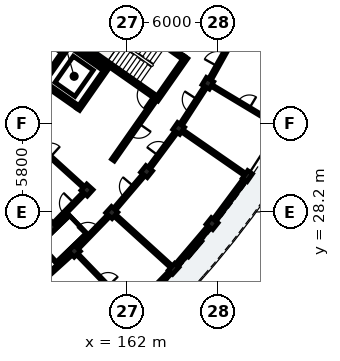
"""IFC4 building model, lengths in metres.
Left out: names, types, materials, properties, quantities, classifications, styles, units other than length and angle.
Written with IfcOpenShell. Run it as: python <this file> out.ifc"""

import sys

from ifc_helpers import new_model, si_unit, direction, frame, frame_2d, origin, origin_2d, place, context, subcontext, project, spatial, rectangle, extrude, element, fill, save


model = new_model("IFC4")
c1 = context("Model", 3, precision=1e-05, world=origin(), true_north=direction((0.0, 1.0)))
c2 = subcontext(c1, "Body", "Model", "MODEL_VIEW")
j1 = project(units=[si_unit("LENGTHUNIT", "METRE"), si_unit("PLANEANGLEUNIT", "RADIAN")], contexts=[c1])
p1 = place(None, origin())
s1 = spatial("IfcSite", under=j1, at=p1, CompositionType="ELEMENT")
p2 = place(p1, origin())
s2 = spatial("IfcBuilding", under=s1, at=p2, CompositionType="ELEMENT")
p3 = place(p2, frame((0.0, 0.0, 22.28)))
s3 = spatial("IfcBuildingStorey", under=s2, at=p3, CompositionType="ELEMENT", Elevation=22.28)
p4 = place(p3, frame((165.733, 38.336, 0.0), z_axis=(0.0, 0.0, 1.0), x_axis=(-0.819153711596, 0.573574055182, 0.0)))
e1 = element("IfcWall", 1, at=p4, inside=s3, PredefinedType="SHEAR", context=c2, shape_type="SweptSolid", body=[
    extrude(rectangle(XDim=6.6, YDim=0.25, at=frame_2d((3.3, 0.0))), origin(), (0.0, 0.0, 1.0), 3.11),
])
p5 = place(p3, frame((165.907, 38.366, 0.0), z_axis=(0.0, 0.0, 1.0), x_axis=(-0.573582112484, -0.819148069789, 0.0)))
e2 = element("IfcWall", 2, at=p5, inside=s3, PredefinedType="SHEAR", context=c2, shape_type="SweptSolid", body=[
    extrude(rectangle(XDim=3.42, YDim=0.25, at=frame_2d((1.71, 0.0))), origin(), (0.0, 0.0, 1.0), 3.11),
])
p6 = place(p3, frame((163.914, 35.739, 0.0), z_axis=(0.0, 0.0, 1.0), x_axis=(-0.819153711596, 0.573574055182, 0.0)))
e3 = element("IfcWall", 3, at=p6, inside=s3, PredefinedType="SHEAR", context=c2, shape_type="SweptSolid", body=[
    extrude(rectangle(XDim=6.6, YDim=0.25, at=frame_2d((3.3, 0.0))), origin(), (0.0, 0.0, 1.0), 3.11),
])
p7 = place(p6, frame((0.22, 0.0, 0.0)))
e4 = element("IfcOpeningElement", 4, at=p7, cuts=e3, PredefinedType="OPENING", context=c2, shape_type="SweptSolid", body=[
    extrude(rectangle(XDim=1.05, YDim=2.15, at=frame_2d((0.525, 1.075))), frame((0.0, 0.135, 0.0), z_axis=(0.0, -1.0, 0.0), x_axis=(1.0, 0.0, 0.0)), (0.0, 0.0, 1.0), 0.27),
])
p8 = place(p3, frame((160.668, 37.615, 0.0), z_axis=(0.0, 0.0, 1.0), x_axis=(-0.573582966431, -0.819147471839, 0.0)))
e5 = element("IfcWall", 5, at=p8, inside=s3, PredefinedType="SHEAR", context=c2, shape_type="SweptSolid", body=[
    extrude(rectangle(XDim=3.26, YDim=0.23, at=frame_2d((1.63, 0.0))), origin(), (0.0, 0.0, 1.0), 3.11),
])
p9 = place(p8, frame((0.9, 0.0, 0.0)))
e6 = element("IfcOpeningElement", 6, at=p9, cuts=e5, PredefinedType="OPENING", context=c2, shape_type="SweptSolid", body=[
    extrude(rectangle(XDim=1.0, YDim=2.15, at=frame_2d((0.5, 1.075))), frame((0.0, 0.125, 0.0), z_axis=(0.0, -1.0, 0.0), x_axis=(1.0, 0.0, 0.0)), (0.0, 0.0, 1.0), 0.25),
])
p10 = place(p3, frame((158.268, 39.296, 0.0), z_axis=(0.0, 0.0, 1.0), x_axis=(-0.573582966431, -0.819147471839, 0.0)))
e7 = element("IfcWall", 7, at=p10, inside=s3, PredefinedType="SHEAR", context=c2, shape_type="SweptSolid", body=[
    extrude(rectangle(XDim=3.26, YDim=0.23, at=frame_2d((1.63, 0.0))), origin(), (0.0, 0.0, 1.0), 3.11),
])
p11 = place(p3, frame((160.508, 37.587, 0.0), z_axis=(0.0, 0.0, 1.0), x_axis=(-0.819189439894, 0.573523026186, 0.0)))
e8 = element("IfcWall", 8, at=p11, inside=s3, PredefinedType="SHEAR", context=c2, shape_type="SweptSolid", body=[
    extrude(rectangle(XDim=2.7, YDim=0.23, at=frame_2d((1.35, 0.0))), origin(), (0.0, 0.0, 1.0), 3.11),
])
p12 = place(p3, frame((158.77, 35.105, 0.0), z_axis=(0.0, 0.0, 1.0), x_axis=(-0.819117209968, 0.573626181702, 0.0)))
e9 = element("IfcWall", 9, at=p12, inside=s3, PredefinedType="SHEAR", context=c2, shape_type="SweptSolid", body=[
    extrude(rectangle(XDim=2.7, YDim=0.23, at=frame_2d((1.35, 0.0))), origin(), (0.0, 0.0, 1.0), 3.11),
])
for number, where, z_axis, x_axis in (
    (10, (157.018, 27.202, 0.0), (0.0, 0.0, 1.0), (0.695, -0.719, 0.0)),
    (11, (158.546, 25.62, 0.0), (0.0, 0.0, 1.0), (0.695, -0.719, 0.0)),
    (12, (159.38, 29.638, 0.0), (0.0, 0.0, 1.0), (0.74, -0.672, 0.0)),
    (13, (161.009, 28.159, 0.0), (0.0, 0.0, 1.0), (0.74, -0.672, 0.0)),
):
    element("IfcColumn", number, at=place(p3, frame(where, z_axis=z_axis, x_axis=x_axis)), inside=s3, PredefinedType="COLUMN", context=c2, shape_type="SweptSolid", body=[
        extrude(rectangle(XDim=0.56, YDim=0.56, at=origin_2d()), origin(), (0.0, 0.0, 1.0), 3.11),
    ])
p13 = place(p3, frame((165.08, 24.46, 0.0), z_axis=(0.0, 0.0, 1.0), x_axis=(0.740218127487, -0.672366807435, 0.0)))
e14 = element("IfcColumn", 14, at=p13, inside=s3, PredefinedType="PILASTER", context=c2, shape_type="SweptSolid", body=[
    extrude(rectangle(XDim=0.38, YDim=0.62, at=origin_2d()), origin(), (0.0, 0.0, 1.0), 3.11),
])
for number, where, z_axis, x_axis in (
    (15, (163.3, 30.853, 0.0), (0.0, 0.0, 1.0), (0.783, -0.623, 0.0)),
    (16, (167.604, 27.429, 0.0), (0.0, 0.0, 1.0), (0.783, -0.623, 0.0)),
    (17, (165.41, 33.692, 0.0), (0.0, 0.0, 1.0), (0.822, -0.57, 0.0)),
):
    element("IfcColumn", number, at=place(p3, frame(where, z_axis=z_axis, x_axis=x_axis)), inside=s3, PredefinedType="COLUMN", context=c2, shape_type="SweptSolid", body=[
        extrude(rectangle(XDim=0.56, YDim=0.56, at=origin_2d()), origin(), (0.0, 0.0, 1.0), 3.11),
    ])
p14 = place(p3, frame((169.929, 30.557, 0.0), z_axis=(0.0, 0.0, 1.0), x_axis=(0.821646937942, -0.569996762596, 0.0)))
e18 = element("IfcColumn", 18, at=p14, inside=s3, PredefinedType="PILASTER", context=c2, shape_type="SweptSolid", body=[
    extrude(rectangle(XDim=0.38, YDim=0.62, at=origin_2d()), origin(), (0.0, 0.0, 1.0), 3.11),
])
p15 = place(p3, frame((167.33, 36.662, 0.0), z_axis=(0.0, 0.0, 1.0), x_axis=(0.857167300702, -0.51503807491, 0.0)))
e19 = element("IfcColumn", 19, at=p15, inside=s3, PredefinedType="COLUMN", context=c2, shape_type="SweptSolid", body=[
    extrude(rectangle(XDim=0.56, YDim=0.56, at=origin_2d()), origin(), (0.0, 0.0, 1.0), 3.11),
])
p16 = place(p3, frame((162.541, 21.843, 0.0), z_axis=(0.0, 0.0, 1.0), x_axis=(0.696205978342, 0.717842068788, 0.0)))
e20 = element("IfcWall", 20, at=p16, inside=s3, PredefinedType="SOLIDWALL", context=c2, shape_type="SweptSolid", body=[
    extrude(rectangle(XDim=3.487, YDim=0.24, at=frame_2d((1.743, 0.0))), origin(), (0.0, 0.0, 1.0), 2.355),
])
p17 = place(p16, frame((0.943, 0.0, 0.35)))
e21 = element("IfcOpeningElement", 21, at=p17, cuts=e20, PredefinedType="OPENING", context=c2, shape_type="SweptSolid", body=[
    extrude(rectangle(XDim=1.6, YDim=1.75, at=frame_2d((0.8, 0.875))), frame((0.0, 0.13, 0.0), z_axis=(0.0, -1.0, 0.0), x_axis=(1.0, 0.0, 0.0)), (0.0, 0.0, 1.0), 0.26),
])
p18 = place(p3, frame((165.184, 24.583, 0.0), z_axis=(0.0, 0.0, 1.0), x_axis=(0.647811002696, 0.761801092665, 0.0)))
e22 = element("IfcWall", 22, at=p18, inside=s3, PredefinedType="SOLIDWALL", context=c2, shape_type="SweptSolid", body=[
    extrude(rectangle(XDim=3.487, YDim=0.24, at=frame_2d((1.743, 0.0))), origin(), (0.0, 0.0, 1.0), 2.355),
])
p19 = place(p18, frame((0.868, 0.0, 0.35)))
e23 = element("IfcOpeningElement", 23, at=p19, cuts=e22, PredefinedType="OPENING", context=c2, shape_type="SweptSolid", body=[
    extrude(rectangle(XDim=1.75, YDim=1.85, at=frame_2d((0.875, 0.925))), frame((0.0, 0.13, 0.0), z_axis=(0.0, -1.0, 0.0), x_axis=(1.0, 0.0, 0.0)), (0.0, 0.0, 1.0), 0.26),
])
p20 = place(p3, frame((167.753, 27.63, 0.0), z_axis=(0.0, 0.0, 1.0), x_axis=(0.596611432616, 0.802530247699, 0.0)))
e24 = element("IfcWall", 24, at=p20, inside=s3, PredefinedType="SOLIDWALL", context=c2, shape_type="SweptSolid", body=[
    extrude(rectangle(XDim=3.487, YDim=0.24, at=frame_2d((1.743, 0.0))), origin(), (0.0, 0.0, 1.0), 2.355),
])
p21 = place(p20, frame((1.153, 0.0, 0.55)))
e25 = element("IfcOpeningElement", 25, at=p21, cuts=e24, PredefinedType="OPENING", context=c2, shape_type="SweptSolid", body=[
    extrude(rectangle(XDim=1.18, YDim=1.48, at=frame_2d((0.59, 0.74))), frame((0.0, 0.13, 0.0), z_axis=(0.0, -1.0, 0.0), x_axis=(1.0, 0.0, 0.0)), (0.0, 0.0, 1.0), 0.26),
])
p22 = place(p3, frame((163.895, 35.624, 0.0), z_axis=(0.0, 0.0, 1.0), x_axis=(-0.573572687386, -0.819154669329, 0.0)))
e26 = element("IfcWall", 26, at=p22, inside=s3, PredefinedType="PARTITIONING", context=c2, shape_type="SweptSolid", body=[
    extrude(rectangle(XDim=4.9, YDim=0.22, at=frame_2d((2.45, 0.0))), origin(), (0.0, 0.0, 1.0), 2.34),
])
p23 = place(p22, frame((1.95, 0.0, 0.0)))
e27 = element("IfcOpeningElement", 27, at=p23, cuts=e26, PredefinedType="OPENING", context=c2, shape_type="SweptSolid", body=[
    extrude(rectangle(XDim=0.98, YDim=2.14, at=frame_2d((0.49, 1.07))), frame((0.0, 0.12, 0.0), z_axis=(0.0, -1.0, 0.0), x_axis=(1.0, 0.0, 0.0)), (0.0, 0.0, 1.0), 0.24),
])
p24 = place(p3, frame((156.183, 23.482, 0.0), z_axis=(0.0, 0.0, 1.0), x_axis=(0.741631592147, 0.670807410163, 0.0)))
e28 = element("IfcWall", 28, at=p24, inside=s3, PredefinedType="PARTITIONING", context=c2, shape_type="SweptSolid", body=[
    extrude(rectangle(XDim=2.837, YDim=0.195, at=frame_2d((1.418, 0.0))), origin(), (0.0, 0.0, 1.0), 2.37),
])
p25 = place(p24, frame((0.924, 0.0, 0.0)))
e29 = element("IfcOpeningElement", 29, at=p25, cuts=e28, PredefinedType="OPENING", context=c2, shape_type="SweptSolid", body=[
    extrude(rectangle(XDim=0.99, YDim=2.16, at=frame_2d((0.495, 1.08))), frame((0.0, 0.107, 0.0), z_axis=(0.0, -1.0, 0.0), x_axis=(1.0, 0.0, 0.0)), (0.0, 0.0, 1.0), 0.215),
])
p26 = place(p3, frame((158.824, 25.332, 0.0), z_axis=(0.0, 0.0, 1.0), x_axis=(0.69466218314, -0.719336118456, 0.0)))
e30 = element("IfcWall", 30, at=p26, inside=s3, PredefinedType="PARTITIONING", context=c2, shape_type="SweptSolid", body=[
    extrude(rectangle(XDim=4.7, YDim=0.125, at=frame_2d((2.35, 0.0))), origin(), (0.0, 0.0, 1.0), 2.37),
])
p27 = place(p26, frame((1.905, 0.0, 0.0)))
e31 = element("IfcOpeningElement", 31, at=p27, cuts=e30, PredefinedType="OPENING", context=c2, shape_type="SweptSolid", body=[
    extrude(rectangle(XDim=0.89, YDim=2.1, at=frame_2d((0.445, 1.05))), frame((0.0, 0.073, 0.0), z_axis=(0.0, -1.0, 0.0), x_axis=(1.0, 0.0, 0.0)), (0.0, 0.0, 1.0), 0.145),
])
p28 = place(p3, frame((158.79, 25.871, 0.0), z_axis=(0.0, 0.0, 1.0), x_axis=(0.696223786753, 0.717824796701, 0.0)))
e32 = element("IfcWall", 32, at=p28, inside=s3, PredefinedType="PARTITIONING", context=c2, shape_type="SweptSolid", body=[
    extrude(rectangle(XDim=2.837, YDim=0.195, at=frame_2d((1.418, 0.0))), origin(), (0.0, 0.0, 1.0), 2.37),
])
p29 = place(p28, frame((0.934, 0.0, 0.0)))
e33 = element("IfcOpeningElement", 33, at=p29, cuts=e32, PredefinedType="OPENING", context=c2, shape_type="SweptSolid", body=[
    extrude(rectangle(XDim=0.97, YDim=2.15, at=frame_2d((0.485, 1.075))), frame((0.0, 0.107, 0.0), z_axis=(0.0, -1.0, 0.0), x_axis=(1.0, 0.0, 0.0)), (0.0, 0.0, 1.0), 0.215),
])
p30 = place(p3, frame((157.262, 27.453, 0.0), z_axis=(0.0, 0.0, 1.0), x_axis=(0.696236443412, 0.717812520694, 0.0)))
e34 = element("IfcWall", 34, at=p30, inside=s3, PredefinedType="PARTITIONING", context=c2, shape_type="SweptSolid", body=[
    extrude(rectangle(XDim=2.693, YDim=0.195, at=frame_2d((1.347, 0.0))), origin(), (0.0, 0.0, 1.0), 2.37),
])
p31 = place(p30, frame((0.862, 0.0, 0.0)))
e35 = element("IfcOpeningElement", 35, at=p31, cuts=e34, PredefinedType="OPENING", context=c2, shape_type="SweptSolid", body=[
    extrude(rectangle(XDim=0.97, YDim=2.15, at=frame_2d((0.485, 1.075))), frame((0.0, 0.107, 0.0), z_axis=(0.0, -1.0, 0.0), x_axis=(1.0, 0.0, 0.0)), (0.0, 0.0, 1.0), 0.215),
])
p32 = place(p3, frame((161.305, 27.89, 0.0), z_axis=(0.0, 0.0, 1.0), x_axis=(0.740212663782, -0.672372822456, 0.0)))
e36 = element("IfcWall", 36, at=p32, inside=s3, PredefinedType="PARTITIONING", context=c2, shape_type="SweptSolid", body=[
    extrude(rectangle(XDim=4.7, YDim=0.175, at=frame_2d((2.35, 0.0))), origin(), (0.0, 0.0, 1.0), 2.37),
])
p33 = place(p3, frame((154.199, 34.344, 0.0), z_axis=(0.0, 0.0, 1.0), x_axis=(0.74023124711, -0.672352363573, 0.0)))
e37 = element("IfcWall", 37, at=p33, inside=s3, PredefinedType="PARTITIONING", context=c2, shape_type="SweptSolid", body=[
    extrude(rectangle(XDim=6.6, YDim=0.125, at=frame_2d((3.3, 0.0))), origin(), (0.0, 0.0, 1.0), 2.37),
])
p34 = place(p33, frame((2.845, 0.0, 0.0)))
e38 = element("IfcOpeningElement", 38, at=p34, cuts=e37, PredefinedType="OPENING", context=c2, shape_type="SweptSolid", body=[
    extrude(rectangle(XDim=0.91, YDim=2.1, at=frame_2d((0.455, 1.05))), frame((0.0, 0.073, 0.0), z_axis=(0.0, -1.0, 0.0), x_axis=(1.0, 0.0, 0.0)), (0.0, 0.0, 1.0), 0.145),
])
p35 = place(p3, frame((161.236, 28.425, 0.0), z_axis=(0.0, 0.0, 1.0), x_axis=(0.64778830669, 0.761820392032, 0.0)))
e39 = element("IfcWall", 39, at=p35, inside=s3, PredefinedType="PARTITIONING", context=c2, shape_type="SweptSolid", body=[
    extrude(rectangle(XDim=2.837, YDim=0.195, at=frame_2d((1.418, 0.0))), origin(), (0.0, 0.0, 1.0), 2.37),
])
p36 = place(p35, frame((0.944, 0.0, 0.0)))
e40 = element("IfcOpeningElement", 40, at=p36, cuts=e39, PredefinedType="OPENING", context=c2, shape_type="SweptSolid", body=[
    extrude(rectangle(XDim=0.95, YDim=2.13, at=frame_2d((0.475, 1.065))), frame((0.0, 0.107, 0.0), z_axis=(0.0, -1.0, 0.0), x_axis=(1.0, 0.0, 0.0)), (0.0, 0.0, 1.0), 0.215),
])
p37 = place(p3, frame((163.509, 31.134, 0.0), z_axis=(0.0, 0.0, 1.0), x_axis=(0.596552136601, 0.802574325727, 0.0)))
e41 = element("IfcWall", 41, at=p37, inside=s3, PredefinedType="PARTITIONING", context=c2, shape_type="SweptSolid", body=[
    extrude(rectangle(XDim=2.837, YDim=0.195, at=frame_2d((1.418, 0.0))), origin(), (0.0, 0.0, 1.0), 2.37),
])
p38 = place(p37, frame((0.954, 0.0, 0.0)))
e42 = element("IfcOpeningElement", 42, at=p38, cuts=e41, PredefinedType="OPENING", context=c2, shape_type="SweptSolid", body=[
    extrude(rectangle(XDim=0.93, YDim=2.12, at=frame_2d((0.465, 1.06))), frame((0.0, 0.107, 0.0), z_axis=(0.0, -1.0, 0.0), x_axis=(1.0, 0.0, 0.0)), (0.0, 0.0, 1.0), 0.215),
])
p39 = place(p3, frame((165.739, 33.464, 0.0), z_axis=(0.0, 0.0, 1.0), x_axis=(0.821638260647, -0.570009270663, 0.0)))
e43 = element("IfcWall", 43, at=p39, inside=s3, PredefinedType="PARTITIONING", context=c2, shape_type="SweptSolid", body=[
    extrude(rectangle(XDim=4.7, YDim=0.175, at=frame_2d((2.35, 0.0))), origin(), (0.0, 0.0, 1.0), 2.37),
])
p40 = place(p3, frame((165.6, 33.986, 0.0), z_axis=(0.0, 0.0, 1.0), x_axis=(0.542787304957, 0.83987019329, 0.0)))
e44 = element("IfcWall", 44, at=p40, inside=s3, PredefinedType="PARTITIONING", context=c2, shape_type="SweptSolid", body=[
    extrude(rectangle(XDim=2.837, YDim=0.195, at=frame_2d((1.418, 0.0))), origin(), (0.0, 0.0, 1.0), 2.37),
])
p41 = place(p40, frame((0.924, 0.0, 0.0)))
e45 = element("IfcOpeningElement", 45, at=p41, cuts=e44, PredefinedType="OPENING", context=c2, shape_type="SweptSolid", body=[
    extrude(rectangle(XDim=0.99, YDim=2.16, at=frame_2d((0.495, 1.08))), frame((0.0, 0.107, 0.0), z_axis=(0.0, -1.0, 0.0), x_axis=(1.0, 0.0, 0.0)), (0.0, 0.0, 1.0), 0.215),
])
p42 = place(p3, frame((167.673, 36.456, 0.0), z_axis=(0.0, 0.0, 1.0), x_axis=(0.857139805444, -0.515083831937, 0.0)))
e46 = element("IfcWall", 46, at=p42, inside=s3, PredefinedType="PARTITIONING", context=c2, shape_type="SweptSolid", body=[
    extrude(rectangle(XDim=4.7, YDim=0.125, at=frame_2d((2.35, 0.0))), origin(), (0.0, 0.0, 1.0), 2.37),
])
p43 = place(p42, frame((1.915, 0.0, 0.0)))
e47 = element("IfcOpeningElement", 47, at=p43, cuts=e46, PredefinedType="OPENING", context=c2, shape_type="SweptSolid", body=[
    extrude(rectangle(XDim=0.87, YDim=2.08, at=frame_2d((0.435, 1.04))), frame((0.0, 0.073, 0.0), z_axis=(0.0, -1.0, 0.0), x_axis=(1.0, 0.0, 0.0)), (0.0, 0.0, 1.0), 0.145),
])
p44 = place(p3, frame((167.5, 36.968, 0.0), z_axis=(0.0, 0.0, 1.0), x_axis=(0.48673124079, 0.8735517725, 0.0)))
e48 = element("IfcWall", 48, at=p44, inside=s3, PredefinedType="PARTITIONING", context=c2, shape_type="SweptSolid", body=[
    extrude(rectangle(XDim=2.837, YDim=0.195, at=frame_2d((1.418, 0.0))), origin(), (0.0, 0.0, 1.0), 2.37),
])
p45 = place(p44, frame((0.934, 0.0, 0.0)))
e49 = element("IfcOpeningElement", 49, at=p45, cuts=e48, PredefinedType="OPENING", context=c2, shape_type="SweptSolid", body=[
    extrude(rectangle(XDim=0.97, YDim=2.15, at=frame_2d((0.485, 1.075))), frame((0.0, 0.107, 0.0), z_axis=(0.0, -1.0, 0.0), x_axis=(1.0, 0.0, 0.0)), (0.0, 0.0, 1.0), 0.215),
])
p46 = place(p17, origin())
e50 = element("IfcWindow", 50, at=p46, inside=s3, PartitioningType="SINGLE_PANEL", PredefinedType="WINDOW", context=c2, shape_type="SweptSolid", body=[
    extrude(rectangle(XDim=1.6, YDim=1.75, at=frame_2d((0.8, 0.875))), frame((0.0, 0.03, 0.0), z_axis=(0.0, -1.0, 0.0), x_axis=(1.0, 0.0, 0.0)), (0.0, 0.0, 1.0), 0.06),
])
fill(e21, e50)
p47 = place(p19, origin())
e51 = element("IfcWindow", 51, at=p47, inside=s3, PartitioningType="SINGLE_PANEL", PredefinedType="WINDOW", context=c2, shape_type="SweptSolid", body=[
    extrude(rectangle(XDim=1.75, YDim=1.85, at=frame_2d((0.875, 0.925))), frame((0.0, 0.03, 0.0), z_axis=(0.0, -1.0, 0.0), x_axis=(1.0, 0.0, 0.0)), (0.0, 0.0, 1.0), 0.06),
])
fill(e23, e51)
p48 = place(p21, origin())
e52 = element("IfcWindow", 52, at=p48, inside=s3, PartitioningType="SINGLE_PANEL", PredefinedType="WINDOW", context=c2, shape_type="SweptSolid", body=[
    extrude(rectangle(XDim=1.18, YDim=1.48, at=frame_2d((0.59, 0.74))), frame((0.0, 0.03, 0.0), z_axis=(0.0, -1.0, 0.0), x_axis=(1.0, 0.0, 0.0)), (0.0, 0.0, 1.0), 0.06),
])
fill(e25, e52)
p49 = place(p7, origin())
e53 = element("IfcDoor", 53, at=p49, inside=s3, OperationType="SINGLE_SWING_LEFT", PredefinedType="DOOR", context=c2, shape_type="SweptSolid", body=[
    extrude(rectangle(XDim=1.05, YDim=2.15, at=frame_2d((0.525, 1.075))), frame((0.0, 0.025, 0.0), z_axis=(0.0, -1.0, 0.0), x_axis=(1.0, 0.0, 0.0)), (0.0, 0.0, 1.0), 0.05),
])
fill(e4, e53)
p50 = place(p9, origin())
e54 = element("IfcDoor", 54, at=p50, inside=s3, OperationType="DOUBLE_DOOR_SLIDING", PredefinedType="DOOR", context=c2, shape_type="SweptSolid", body=[
    extrude(rectangle(XDim=1.0, YDim=2.15, at=frame_2d((0.5, 1.075))), frame((0.0, 0.025, 0.0), z_axis=(0.0, -1.0, 0.0), x_axis=(1.0, 0.0, 0.0)), (0.0, 0.0, 1.0), 0.05),
])
fill(e6, e54)
p51 = place(p23, origin())
e55 = element("IfcDoor", 55, at=p51, inside=s3, OperationType="SINGLE_SWING_LEFT", PredefinedType="DOOR", context=c2, shape_type="SweptSolid", body=[
    extrude(rectangle(XDim=0.98, YDim=2.14, at=frame_2d((0.49, 1.07))), frame((0.0, 0.025, 0.0), z_axis=(0.0, -1.0, 0.0), x_axis=(1.0, 0.0, 0.0)), (0.0, 0.0, 1.0), 0.05),
])
fill(e27, e55)
p52 = place(p25, origin())
e56 = element("IfcDoor", 56, at=p52, inside=s3, OperationType="SINGLE_SWING_RIGHT", PredefinedType="DOOR", context=c2, shape_type="SweptSolid", body=[
    extrude(rectangle(XDim=0.99, YDim=2.16, at=frame_2d((0.495, 1.08))), frame((0.0, 0.025, 0.0), z_axis=(0.0, -1.0, 0.0), x_axis=(1.0, 0.0, 0.0)), (0.0, 0.0, 1.0), 0.05),
])
fill(e29, e56)
p53 = place(p27, origin())
e57 = element("IfcDoor", 57, at=p53, inside=s3, OperationType="SINGLE_SWING_RIGHT", PredefinedType="DOOR", context=c2, shape_type="SweptSolid", body=[
    extrude(rectangle(XDim=0.89, YDim=2.1, at=frame_2d((0.445, 1.05))), frame((0.0, 0.025, 0.0), z_axis=(0.0, -1.0, 0.0), x_axis=(1.0, 0.0, 0.0)), (0.0, 0.0, 1.0), 0.05),
])
fill(e31, e57)
p54 = place(p29, origin())
e58 = element("IfcDoor", 58, at=p54, inside=s3, OperationType="SINGLE_SWING_LEFT", PredefinedType="DOOR", context=c2, shape_type="SweptSolid", body=[
    extrude(rectangle(XDim=0.97, YDim=2.15, at=frame_2d((0.485, 1.075))), frame((0.0, 0.025, 0.0), z_axis=(0.0, -1.0, 0.0), x_axis=(1.0, 0.0, 0.0)), (0.0, 0.0, 1.0), 0.05),
])
fill(e33, e58)
p55 = place(p31, origin())
e59 = element("IfcDoor", 59, at=p55, inside=s3, OperationType="SINGLE_SWING_RIGHT", PredefinedType="DOOR", context=c2, shape_type="SweptSolid", body=[
    extrude(rectangle(XDim=0.97, YDim=2.15, at=frame_2d((0.485, 1.075))), frame((0.0, 0.025, 0.0), z_axis=(0.0, -1.0, 0.0), x_axis=(1.0, 0.0, 0.0)), (0.0, 0.0, 1.0), 0.05),
])
fill(e35, e59)
p56 = place(p36, origin())
e60 = element("IfcDoor", 60, at=p56, inside=s3, OperationType="SINGLE_SWING_RIGHT", PredefinedType="DOOR", context=c2, shape_type="SweptSolid", body=[
    extrude(rectangle(XDim=0.95, YDim=2.13, at=frame_2d((0.475, 1.065))), frame((0.0, 0.025, 0.0), z_axis=(0.0, -1.0, 0.0), x_axis=(1.0, 0.0, 0.0)), (0.0, 0.0, 1.0), 0.05),
])
fill(e40, e60)
p57 = place(p38, origin())
e61 = element("IfcDoor", 61, at=p57, inside=s3, OperationType="SINGLE_SWING_LEFT", PredefinedType="DOOR", context=c2, shape_type="SweptSolid", body=[
    extrude(rectangle(XDim=0.93, YDim=2.12, at=frame_2d((0.465, 1.06))), frame((0.0, 0.025, 0.0), z_axis=(0.0, -1.0, 0.0), x_axis=(1.0, 0.0, 0.0)), (0.0, 0.0, 1.0), 0.05),
])
fill(e42, e61)
p58 = place(p41, origin())
e62 = element("IfcDoor", 62, at=p58, inside=s3, OperationType="SINGLE_SWING_RIGHT", PredefinedType="DOOR", context=c2, shape_type="SweptSolid", body=[
    extrude(rectangle(XDim=0.99, YDim=2.16, at=frame_2d((0.495, 1.08))), frame((0.0, 0.025, 0.0), z_axis=(0.0, -1.0, 0.0), x_axis=(1.0, 0.0, 0.0)), (0.0, 0.0, 1.0), 0.05),
])
fill(e45, e62)
p59 = place(p43, origin())
e63 = element("IfcDoor", 63, at=p59, inside=s3, OperationType="SINGLE_SWING_RIGHT", PredefinedType="DOOR", context=c2, shape_type="SweptSolid", body=[
    extrude(rectangle(XDim=0.87, YDim=2.08, at=frame_2d((0.435, 1.04))), frame((0.0, 0.025, 0.0), z_axis=(0.0, -1.0, 0.0), x_axis=(1.0, 0.0, 0.0)), (0.0, 0.0, 1.0), 0.05),
])
fill(e47, e63)
p60 = place(p45, origin())
e64 = element("IfcDoor", 64, at=p60, inside=s3, OperationType="SINGLE_SWING_LEFT", PredefinedType="DOOR", context=c2, shape_type="SweptSolid", body=[
    extrude(rectangle(XDim=0.97, YDim=2.15, at=frame_2d((0.485, 1.075))), frame((0.0, 0.025, 0.0), z_axis=(0.0, -1.0, 0.0), x_axis=(1.0, 0.0, 0.0)), (0.0, 0.0, 1.0), 0.05),
])
fill(e49, e64)
save(model, sys.argv[1])
